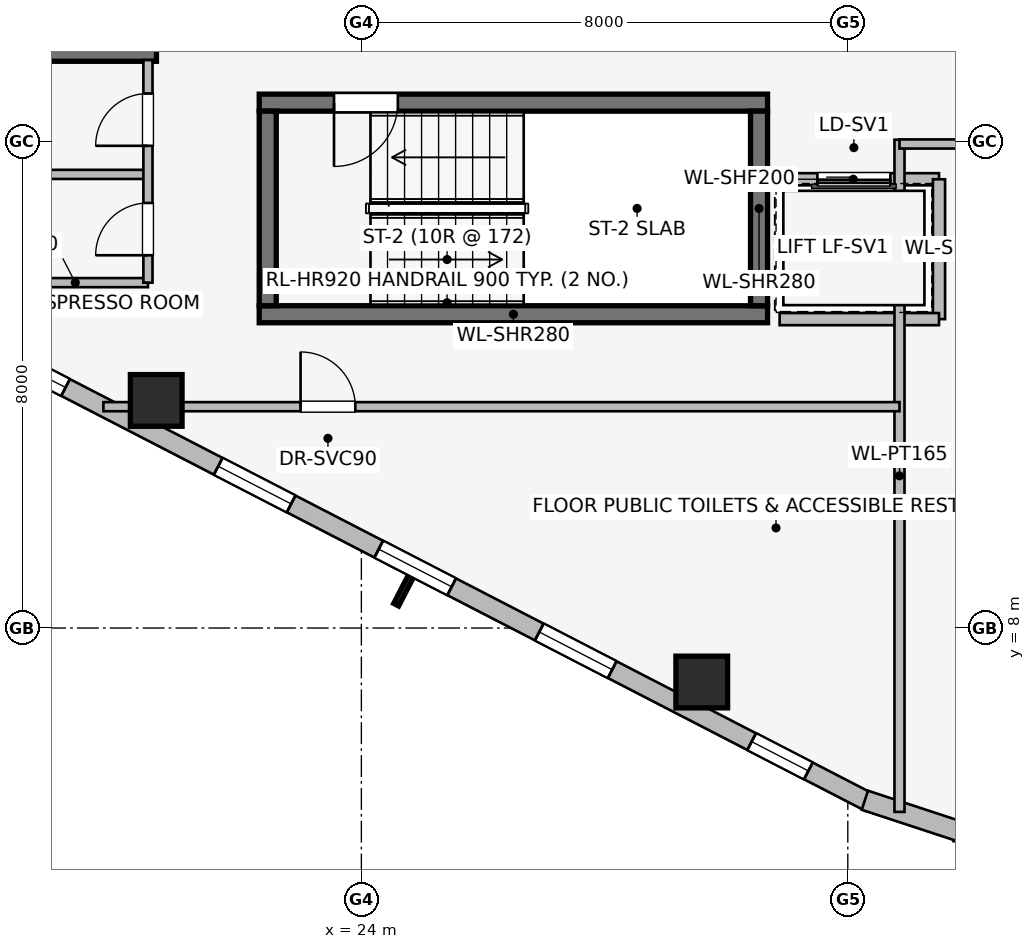
"""IFC4 building model, lengths in metres.
Left out: names, types, materials, properties, quantities, classifications, styles, units other than length and angle.
Written with IfcOpenShell. Run it as: python <this file> out.ifc"""

import sys

from ifc_helpers import new_model, si_unit, direction, frame, frame_2d, origin, origin_2d, place, context, subcontext, project, spatial, rectangle, extrude, element, fill, save


model = new_model("IFC4")
c1 = context("Model", 3, precision=1e-05, world=origin(), true_north=direction((0.0, 1.0)))
c2 = subcontext(c1, "Body", "Model", "MODEL_VIEW")
j1 = project(units=[si_unit("LENGTHUNIT", "METRE"), si_unit("PLANEANGLEUNIT", "RADIAN")], contexts=[c1])
p1 = place(None, origin())
s1 = spatial("IfcSite", under=j1, at=p1, CompositionType="ELEMENT")
p2 = place(p1, origin())
s2 = spatial("IfcBuilding", under=s1, at=p2, CompositionType="ELEMENT")
p3 = place(p2, frame((0.0, 0.0, 167.1)))
s3 = spatial("IfcBuildingStorey", under=s2, at=p3, CompositionType="ELEMENT", Elevation=167.1)
p4 = place(p3, frame((16.87, 17.46, 0.0), z_axis=(0.0, 0.0, 1.0), x_axis=(1.0, 0.0, 0.0)))
e1 = element("IfcWall", 1, at=p4, inside=s3, PredefinedType="SHEAR", context=c2, shape_type="SweptSolid", body=[
    extrude(rectangle(XDim=3.76, YDim=0.28, at=frame_2d((1.88, 0.0))), origin(), (0.0, 0.0, 1.0), 3.45),
])
p5 = place(p3, frame((22.32, 13.16, 0.0), z_axis=(0.0, 0.0, 1.0), x_axis=(1.0, 0.0, 0.0)))
e2 = element("IfcWall", 2, at=p5, inside=s3, PredefinedType="SHEAR", context=c2, shape_type="SweptSolid", body=[
    extrude(rectangle(XDim=8.36, YDim=0.28, at=frame_2d((4.18, 0.0))), origin(), (0.0, 0.0, 1.0), 3.45),
])
p6 = place(p3, frame((30.68, 16.64, 0.0), z_axis=(0.0, 0.0, 1.0), x_axis=(-1.0, 0.0, 0.0)))
e3 = element("IfcWall", 3, at=p6, inside=s3, PredefinedType="SHEAR", context=c2, shape_type="SweptSolid", body=[
    extrude(rectangle(XDim=8.36, YDim=0.28, at=frame_2d((4.18, 0.0))), origin(), (0.0, 0.0, 1.0), 3.45),
])
p7 = place(p6, frame((6.08, 0.0, 0.0)))
e4 = element("IfcOpeningElement", 4, at=p7, cuts=e3, PredefinedType="OPENING", context=c2, shape_type="SweptSolid", body=[
    extrude(rectangle(XDim=1.05, YDim=2.0, at=frame_2d((0.525, 1.0))), frame((0.0, 0.15, 0.0), z_axis=(0.0, -1.0, 0.0), x_axis=(1.0, 0.0, 0.0)), (0.0, 0.0, 1.0), 0.3),
])
for number, where, z_axis, x_axis in (
    (5, (22.46, 16.5, 0.0), (0.0, 0.0, 1.0), (0.0, -1.0, 0.0)),
    (6, (30.54, 13.3, 0.0), (0.0, 0.0, 1.0), (0.0, 1.0, 0.0)),
):
    element("IfcWall", number, at=place(p3, frame(where, z_axis=z_axis, x_axis=x_axis)), inside=s3, PredefinedType="SHEAR", context=c2, shape_type="SweptSolid", body=[
        extrude(rectangle(XDim=3.2, YDim=0.28, at=frame_2d((1.6, 0.0))), origin(), (0.0, 0.0, 1.0), 3.45),
    ])
for number, where, z_axis, x_axis in (
    (7, (20.626, 11.743, 0.0), (0.0, 0.0, 1.0), (1.0, 0.0, 0.0)),
    (8, (29.598, 7.112, 0.0), (0.0, 0.0, 1.0), (1.0, 0.0, 0.0)),
):
    element("IfcColumn", number, at=place(p3, frame(where, z_axis=z_axis, x_axis=x_axis)), inside=s3, PredefinedType="COLUMN", context=c2, shape_type="SweptSolid", body=[
        extrude(rectangle(XDim=0.85, YDim=0.85, at=origin_2d()), origin(), (0.0, 0.0, 1.0), 3.45),
    ])
p8 = place(p3, frame((32.362, 5.129, 0.0), z_axis=(0.0, 0.0, 1.0), x_axis=(-0.888626188278, 0.458632202867, 0.0)))
e9 = element("IfcWall", 9, at=p8, inside=s3, PredefinedType="STANDARD", context=c2, shape_type="SweptSolid", body=[
    extrude(rectangle(XDim=16.828, YDim=0.31, at=frame_2d((8.414, 0.0))), origin(), (0.0, 0.0, 1.0), 3.19),
])
p9 = place(p8, frame((1.137, 0.0, 0.75)))
e10 = element("IfcOpeningElement", 10, at=p9, cuts=e9, PredefinedType="OPENING", context=c2, shape_type="SweptSolid", body=[
    extrude(rectangle(XDim=1.05, YDim=1.4, at=frame_2d((0.525, 0.7))), frame((0.0, 0.165, 0.0), z_axis=(0.0, -1.0, 0.0), x_axis=(1.0, 0.0, 0.0)), (0.0, 0.0, 1.0), 0.33),
])
p10 = place(p8, frame((4.768, 0.0, 0.75)))
e11 = element("IfcOpeningElement", 11, at=p10, cuts=e9, PredefinedType="OPENING", context=c2, shape_type="SweptSolid", body=[
    extrude(rectangle(XDim=1.35, YDim=1.45, at=frame_2d((0.675, 0.725))), frame((0.0, 0.165, 0.0), z_axis=(0.0, -1.0, 0.0), x_axis=(1.0, 0.0, 0.0)), (0.0, 0.0, 1.0), 0.33),
])
p11 = place(p8, frame((7.739, 0.0, 0.75)))
e12 = element("IfcOpeningElement", 12, at=p11, cuts=e9, PredefinedType="OPENING", context=c2, shape_type="SweptSolid", body=[
    extrude(rectangle(XDim=1.35, YDim=1.45, at=frame_2d((0.675, 0.725))), frame((0.0, 0.165, 0.0), z_axis=(0.0, -1.0, 0.0), x_axis=(1.0, 0.0, 0.0)), (0.0, 0.0, 1.0), 0.33),
])
p12 = place(p8, frame((10.71, 0.0, 0.75)))
e13 = element("IfcOpeningElement", 13, at=p12, cuts=e9, PredefinedType="OPENING", context=c2, shape_type="SweptSolid", body=[
    extrude(rectangle(XDim=1.35, YDim=1.45, at=frame_2d((0.675, 0.725))), frame((0.0, 0.165, 0.0), z_axis=(0.0, -1.0, 0.0), x_axis=(1.0, 0.0, 0.0)), (0.0, 0.0, 1.0), 0.33),
])
p13 = place(p8, frame((14.885, 0.0, 0.75)))
e14 = element("IfcOpeningElement", 14, at=p13, cuts=e9, PredefinedType="OPENING", context=c2, shape_type="SweptSolid", body=[
    extrude(rectangle(XDim=1.05, YDim=1.4, at=frame_2d((0.525, 0.7))), frame((0.0, 0.165, 0.0), z_axis=(0.0, -1.0, 0.0), x_axis=(1.0, 0.0, 0.0)), (0.0, 0.0, 1.0), 0.33),
])
p14 = place(p3, frame((35.461, 4.659, 0.0), z_axis=(0.0, 0.0, 1.0), x_axis=(-1.0, 0.0, 0.0)))
e15 = element("IfcWall", 15, at=p14, inside=s3, PredefinedType="STANDARD", context=c2, shape_type="SweptSolid", body=[
    extrude(rectangle(XDim=1.722, YDim=0.33, at=frame_2d((0.861, 0.0))), origin(), (0.0, 0.0, 1.0), 3.19),
])
p15 = place(p3, frame((33.917, 4.63, 0.0), z_axis=(0.0, 0.0, 1.0), x_axis=(-0.949937416267, 0.312440242569, 0.0)))
e16 = element("IfcWall", 16, at=p15, inside=s3, PredefinedType="STANDARD", context=c2, shape_type="SweptSolid", body=[
    extrude(rectangle(XDim=1.722, YDim=0.33, at=frame_2d((0.861, 0.0))), origin(), (0.0, 0.0, 1.0), 3.19),
])
p16 = place(p3, frame((33.5, 15.38, 0.0), z_axis=(0.0, 0.0, 1.0), x_axis=(-1.0, 0.0, 0.0)))
e17 = element("IfcWall", 17, at=p16, inside=s3, PredefinedType="PARTITIONING", context=c2, shape_type="SweptSolid", body=[
    extrude(rectangle(XDim=2.82, YDim=0.2, at=frame_2d((1.41, 0.0))), origin(), (0.0, 0.0, 1.0), 3.19),
])
p17 = place(p16, frame((0.8, 0.0, 0.0)))
e18 = element("IfcOpeningElement", 18, at=p17, cuts=e17, PredefinedType="OPENING", context=c2, shape_type="SweptSolid", body=[
    extrude(rectangle(XDim=1.2, YDim=2.2, at=frame_2d((0.6, 1.1))), frame((0.0, 0.11, 0.0), z_axis=(0.0, -1.0, 0.0), x_axis=(1.0, 0.0, 0.0)), (0.0, 0.0, 1.0), 0.22),
])
p18 = place(p3, frame((33.5, 13.08, 0.0), z_axis=(0.0, 0.0, 1.0), x_axis=(0.0, 1.0, 0.0)))
e19 = element("IfcWall", 19, at=p18, inside=s3, PredefinedType="PARTITIONING", context=c2, shape_type="SweptSolid", body=[
    extrude(rectangle(XDim=2.3, YDim=0.2, at=frame_2d((1.15, 0.0))), origin(), (0.0, 0.0, 1.0), 3.19),
])
p19 = place(p3, frame((30.879, 13.08, 0.0), z_axis=(0.0, 0.0, 1.0), x_axis=(1.0, 0.0, 0.0)))
e20 = element("IfcWall", 20, at=p19, inside=s3, PredefinedType="PARTITIONING", context=c2, shape_type="SweptSolid", body=[
    extrude(rectangle(XDim=2.621, YDim=0.2, at=frame_2d((1.311, 0.0))), origin(), (0.0, 0.0, 1.0), 3.19),
])
for number, where, z_axis, x_axis in (
    (21, (18.1, 13.68, 0.0), (0.0, 0.0, 1.0), (1.0, 0.0, 0.0)),
    (22, (18.1, 15.46, 0.0), (0.0, 0.0, 1.0), (1.0, 0.0, 0.0)),
):
    element("IfcWall", number, at=place(p3, frame(where, z_axis=z_axis, x_axis=x_axis)), inside=s3, PredefinedType="PARTITIONING", context=c2, shape_type="SweptSolid", body=[
        extrude(rectangle(XDim=2.39, YDim=0.15, at=frame_2d((1.195, 0.0))), origin(), (0.0, 0.0, 1.0), 3.19),
    ])
p20 = place(p3, frame((20.49, 13.68, 0.0), z_axis=(0.0, 0.0, 1.0), x_axis=(0.0, 1.0, 0.0)))
e23 = element("IfcWall", 23, at=p20, inside=s3, PredefinedType="PARTITIONING", context=c2, shape_type="SweptSolid", body=[
    extrude(rectangle(XDim=3.66, YDim=0.15, at=frame_2d((1.83, 0.0))), origin(), (0.0, 0.0, 1.0), 3.19),
])
p21 = place(p20, frame((0.45, 0.0, 0.0)))
e24 = element("IfcOpeningElement", 24, at=p21, cuts=e23, PredefinedType="OPENING", context=c2, shape_type="SweptSolid", body=[
    extrude(rectangle(XDim=0.86, YDim=2.0, at=frame_2d((0.43, 1.0))), frame((0.0, 0.085, 0.0), z_axis=(0.0, -1.0, 0.0), x_axis=(1.0, 0.0, 0.0)), (0.0, 0.0, 1.0), 0.17),
])
p22 = place(p20, frame((2.25, 0.0, 0.0)))
e25 = element("IfcOpeningElement", 25, at=p22, cuts=e23, PredefinedType="OPENING", context=c2, shape_type="SweptSolid", body=[
    extrude(rectangle(XDim=0.86, YDim=2.0, at=frame_2d((0.43, 1.0))), frame((0.0, 0.085, 0.0), z_axis=(0.0, -1.0, 0.0), x_axis=(1.0, 0.0, 0.0)), (0.0, 0.0, 1.0), 0.17),
])
p23 = place(p3, frame((32.85, 4.976, 0.0), z_axis=(0.0, 0.0, 1.0), x_axis=(0.0, 1.0, 0.0)))
e26 = element("IfcWall", 26, at=p23, inside=s3, PredefinedType="PARTITIONING", context=c2, shape_type="SweptSolid", body=[
    extrude(rectangle(XDim=11.054, YDim=0.165, at=frame_2d((5.527, 0.0))), origin(), (0.0, 0.0, 1.0), 3.19),
])
p24 = place(p3, frame((19.757, 11.64, 0.0), z_axis=(0.0, 0.0, 1.0), x_axis=(1.0, 0.0, 0.0)))
e27 = element("IfcWall", 27, at=p24, inside=s3, PredefinedType="PARTITIONING", context=c2, shape_type="SweptSolid", body=[
    extrude(rectangle(XDim=13.093, YDim=0.15, at=frame_2d((6.546, 0.0))), origin(), (0.0, 0.0, 1.0), 3.19),
])
p25 = place(p24, frame((3.243, 0.0, 0.0)))
e28 = element("IfcOpeningElement", 28, at=p25, cuts=e27, PredefinedType="OPENING", context=c2, shape_type="SweptSolid", body=[
    extrude(rectangle(XDim=0.9, YDim=2.0, at=frame_2d((0.45, 1.0))), frame((0.0, 0.085, 0.0), z_axis=(0.0, -1.0, 0.0), x_axis=(1.0, 0.0, 0.0)), (0.0, 0.0, 1.0), 0.17),
])
p26 = place(p3, frame((32.85, 15.96, 0.0), z_axis=(0.0, 0.0, 1.0), x_axis=(1.0, 0.0, 0.0)))
e29 = element("IfcWall", 29, at=p26, inside=s3, PredefinedType="PARTITIONING", context=c2, shape_type="SweptSolid", body=[
    extrude(rectangle(XDim=4.664, YDim=0.15, at=frame_2d((2.332, 0.0))), origin(), (0.0, 0.0, 1.0), 3.19),
])
p27 = place(p26, frame((1.852, 0.0, 0.0)))
e30 = element("IfcOpeningElement", 30, at=p27, cuts=e29, PredefinedType="OPENING", context=c2, shape_type="SweptSolid", body=[
    extrude(rectangle(XDim=0.96, YDim=2.0, at=frame_2d((0.48, 1.0))), frame((0.0, 0.085, 0.0), z_axis=(0.0, -1.0, 0.0), x_axis=(1.0, 0.0, 0.0)), (0.0, 0.0, 1.0), 0.17),
])
p28 = place(p9, origin())
e31 = element("IfcWindow", 31, at=p28, inside=s3, PartitioningType="SINGLE_PANEL", PredefinedType="WINDOW", context=c2, shape_type="SweptSolid", body=[
    extrude(rectangle(XDim=1.05, YDim=1.4, at=frame_2d((0.525, 0.7))), frame((0.0, 0.03, 0.0), z_axis=(0.0, -1.0, 0.0), x_axis=(1.0, 0.0, 0.0)), (0.0, 0.0, 1.0), 0.06),
])
fill(e10, e31)
p29 = place(p10, origin())
e32 = element("IfcWindow", 32, at=p29, inside=s3, PartitioningType="SINGLE_PANEL", PredefinedType="WINDOW", context=c2, shape_type="SweptSolid", body=[
    extrude(rectangle(XDim=1.35, YDim=1.45, at=frame_2d((0.675, 0.725))), frame((0.0, 0.03, 0.0), z_axis=(0.0, -1.0, 0.0), x_axis=(1.0, 0.0, 0.0)), (0.0, 0.0, 1.0), 0.06),
])
fill(e11, e32)
p30 = place(p11, origin())
e33 = element("IfcWindow", 33, at=p30, inside=s3, PartitioningType="SINGLE_PANEL", PredefinedType="WINDOW", context=c2, shape_type="SweptSolid", body=[
    extrude(rectangle(XDim=1.35, YDim=1.45, at=frame_2d((0.675, 0.725))), frame((0.0, 0.03, 0.0), z_axis=(0.0, -1.0, 0.0), x_axis=(1.0, 0.0, 0.0)), (0.0, 0.0, 1.0), 0.06),
])
fill(e12, e33)
p31 = place(p12, origin())
e34 = element("IfcWindow", 34, at=p31, inside=s3, PartitioningType="SINGLE_PANEL", PredefinedType="WINDOW", context=c2, shape_type="SweptSolid", body=[
    extrude(rectangle(XDim=1.35, YDim=1.45, at=frame_2d((0.675, 0.725))), frame((0.0, 0.03, 0.0), z_axis=(0.0, -1.0, 0.0), x_axis=(1.0, 0.0, 0.0)), (0.0, 0.0, 1.0), 0.06),
])
fill(e13, e34)
p32 = place(p13, origin())
e35 = element("IfcWindow", 35, at=p32, inside=s3, PartitioningType="SINGLE_PANEL", PredefinedType="WINDOW", context=c2, shape_type="SweptSolid", body=[
    extrude(rectangle(XDim=1.05, YDim=1.4, at=frame_2d((0.525, 0.7))), frame((0.0, 0.03, 0.0), z_axis=(0.0, -1.0, 0.0), x_axis=(1.0, 0.0, 0.0)), (0.0, 0.0, 1.0), 0.06),
])
fill(e14, e35)
p33 = place(p7, origin())
e36 = element("IfcDoor", 36, at=p33, inside=s3, OperationType="SINGLE_SWING_RIGHT", PredefinedType="DOOR", context=c2, shape_type="SweptSolid", body=[
    extrude(rectangle(XDim=1.05, YDim=2.0, at=frame_2d((0.525, 1.0))), frame((0.0, 0.025, 0.0), z_axis=(0.0, -1.0, 0.0), x_axis=(1.0, 0.0, 0.0)), (0.0, 0.0, 1.0), 0.05),
])
fill(e4, e36)
p34 = place(p17, origin())
e37 = element("IfcDoor", 37, at=p34, inside=s3, OperationType="SLIDING_TO_RIGHT", PredefinedType="DOOR", context=c2, shape_type="SweptSolid", body=[
    extrude(rectangle(XDim=1.2, YDim=2.2, at=frame_2d((0.6, 1.1))), frame((0.0, 0.025, 0.0), z_axis=(0.0, -1.0, 0.0), x_axis=(1.0, 0.0, 0.0)), (0.0, 0.0, 1.0), 0.05),
])
fill(e18, e37)
p35 = place(p21, origin())
e38 = element("IfcDoor", 38, at=p35, inside=s3, OperationType="SINGLE_SWING_LEFT", PredefinedType="DOOR", context=c2, shape_type="SweptSolid", body=[
    extrude(rectangle(XDim=0.86, YDim=2.0, at=frame_2d((0.43, 1.0))), frame((0.0, 0.025, 0.0), z_axis=(0.0, -1.0, 0.0), x_axis=(1.0, 0.0, 0.0)), (0.0, 0.0, 1.0), 0.05),
])
fill(e24, e38)
p36 = place(p22, origin())
e39 = element("IfcDoor", 39, at=p36, inside=s3, OperationType="SINGLE_SWING_LEFT", PredefinedType="DOOR", context=c2, shape_type="SweptSolid", body=[
    extrude(rectangle(XDim=0.86, YDim=2.0, at=frame_2d((0.43, 1.0))), frame((0.0, 0.025, 0.0), z_axis=(0.0, -1.0, 0.0), x_axis=(1.0, 0.0, 0.0)), (0.0, 0.0, 1.0), 0.05),
])
fill(e25, e39)
p37 = place(p25, origin())
e40 = element("IfcDoor", 40, at=p37, inside=s3, OperationType="SINGLE_SWING_LEFT", PredefinedType="DOOR", context=c2, shape_type="SweptSolid", body=[
    extrude(rectangle(XDim=0.9, YDim=2.0, at=frame_2d((0.45, 1.0))), frame((0.0, 0.025, 0.0), z_axis=(0.0, -1.0, 0.0), x_axis=(1.0, 0.0, 0.0)), (0.0, 0.0, 1.0), 0.05),
])
fill(e28, e40)
save(model, sys.argv[1])
